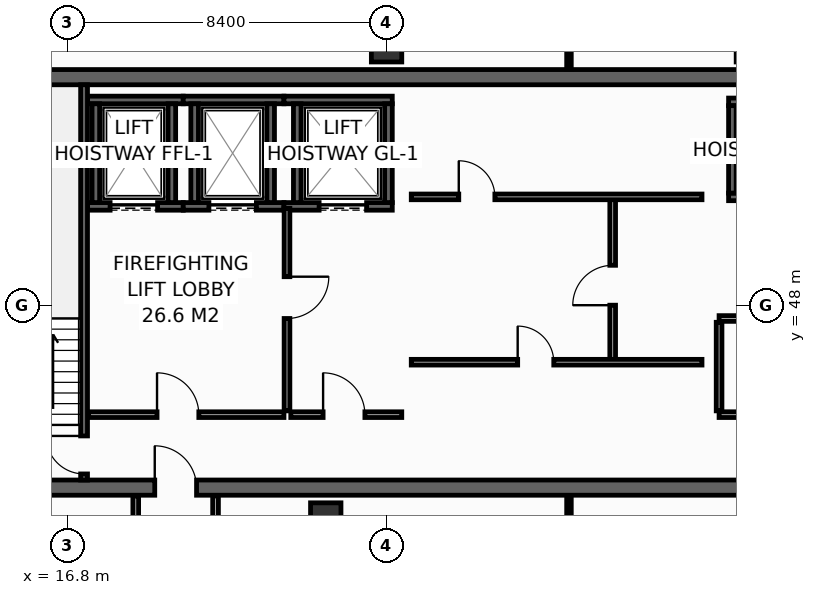
"""IFC4 building model, lengths in metres.
Left out: names, types, materials, properties, quantities, classifications, styles, units other than length and angle.
Written with IfcOpenShell. Run it as: python <this file> out.ifc"""

import sys

from ifc_helpers import new_model, si_unit, direction, frame, frame_2d, origin, origin_2d, place, context, subcontext, project, spatial, rectangle, hollow_rectangle, extrude, element, fill, save


model = new_model("IFC4")
c1 = context("Model", 3, precision=1e-05, world=origin(), true_north=direction((0.0, 1.0)))
c2 = subcontext(c1, "Body", "Model", "MODEL_VIEW")
j1 = project(units=[si_unit("LENGTHUNIT", "METRE"), si_unit("PLANEANGLEUNIT", "RADIAN")], contexts=[c1])
p1 = place(None, origin())
s1 = spatial("IfcSite", under=j1, at=p1, CompositionType="ELEMENT")
p2 = place(p1, origin())
s2 = spatial("IfcBuilding", under=s1, at=p2, CompositionType="ELEMENT")
p3 = place(p2, frame((0.0, 0.0, 234.4)))
s3 = spatial("IfcBuildingStorey", under=s2, at=p3, CompositionType="ELEMENT", Elevation=234.4)
p4 = place(p3, frame((13.7, 43.2, 0.0), z_axis=(0.0, 0.0, 1.0), x_axis=(1.0, 0.0, 0.0)))
e1 = element("IfcWall", 1, at=p4, inside=s3, PredefinedType="SHEAR", context=c2, shape_type="SweptSolid", body=[
    extrude(rectangle(XDim=32.5, YDim=0.4, at=frame_2d((16.25, 0.0))), origin(), (0.0, 0.0, 1.0), 3.55),
])
p5 = place(p4, frame((5.4, 0.0, 0.0)))
e2 = element("IfcOpeningElement", 2, at=p5, cuts=e1, PredefinedType="OPENING", context=c2, shape_type="SweptSolid", body=[
    extrude(rectangle(XDim=1.1, YDim=2.15, at=frame_2d((0.55, 1.075))), frame((0.0, 0.21, 0.0), z_axis=(0.0, -1.0, 0.0), x_axis=(1.0, 0.0, 0.0)), (0.0, 0.0, 1.0), 0.42),
])
p6 = place(p4, frame((25.6, 0.0, 0.0)))
e3 = element("IfcOpeningElement", 3, at=p6, cuts=e1, PredefinedType="OPENING", context=c2, shape_type="SweptSolid", body=[
    extrude(rectangle(XDim=1.1, YDim=2.15, at=frame_2d((0.55, 1.075))), frame((0.0, 0.21, 0.0), z_axis=(0.0, -1.0, 0.0), x_axis=(1.0, 0.0, 0.0)), (0.0, 0.0, 1.0), 0.42),
])
p7 = place(p3, frame((13.7, 54.0, 0.0), z_axis=(0.0, 0.0, 1.0), x_axis=(1.0, 0.0, 0.0)))
e4 = element("IfcWall", 4, at=p7, inside=s3, PredefinedType="SHEAR", context=c2, shape_type="SweptSolid", body=[
    extrude(rectangle(XDim=32.5, YDim=0.4, at=frame_2d((16.25, 0.0))), origin(), (0.0, 0.0, 1.0), 3.55),
])
for number, where, z_axis, x_axis in (
    (5, (25.2, 54.8, 0.0), (0.0, 0.0, 1.0), (1.0, 0.0, 0.0)),
    (6, (23.6, 42.4, 0.0), (0.0, 0.0, 1.0), (1.0, 0.0, 0.0)),
):
    element("IfcColumn", number, at=place(p3, frame(where, z_axis=z_axis, x_axis=x_axis)), inside=s3, PredefinedType="COLUMN", context=c2, shape_type="SweptSolid", body=[
        extrude(hollow_rectangle(XDim=0.8, YDim=0.8, WallThickness=0.036, at=origin_2d()), origin(), (0.0, 0.0, 1.0), 3.8),
    ])
p8 = place(p3, frame((17.33, 50.6, 0.0), z_axis=(0.0, 0.0, 1.0), x_axis=(1.0, 0.0, 0.0)))
e7 = element("IfcWall", 7, at=p8, inside=s3, PredefinedType="SHEAR", context=c2, shape_type="SweptSolid", body=[
    extrude(rectangle(XDim=2.52, YDim=0.2, at=frame_2d((1.26, 0.0))), origin(), (0.0, 0.0, 1.0), 3.55),
])
p9 = place(p8, frame((0.595, 0.0, 0.0)))
e8 = element("IfcOpeningElement", 8, at=p9, cuts=e7, PredefinedType="OPENING", context=c2, shape_type="SweptSolid", body=[
    extrude(rectangle(XDim=1.25, YDim=2.3, at=frame_2d((0.625, 1.15))), frame((0.0, 0.11, 0.0), z_axis=(0.0, -1.0, 0.0), x_axis=(1.0, 0.0, 0.0)), (0.0, 0.0, 1.0), 0.22),
])
p10 = place(p3, frame((17.33, 53.4, 0.0), z_axis=(0.0, 0.0, 1.0), x_axis=(1.0, 0.0, 0.0)))
e9 = element("IfcWall", 9, at=p10, inside=s3, PredefinedType="SHEAR", context=c2, shape_type="SweptSolid", body=[
    extrude(rectangle(XDim=2.52, YDim=0.2, at=frame_2d((1.26, 0.0))), origin(), (0.0, 0.0, 1.0), 3.55),
])
for number, where, z_axis, x_axis in (
    (10, (17.55, 50.7, 0.0), (0.0, 0.0, 1.0), (0.0, 1.0, 0.0)),
    (11, (19.55, 50.7, 0.0), (0.0, 0.0, 1.0), (0.0, 1.0, 0.0)),
):
    element("IfcWall", number, at=place(p3, frame(where, z_axis=z_axis, x_axis=x_axis)), inside=s3, PredefinedType="SHEAR", context=c2, shape_type="SweptSolid", body=[
        extrude(rectangle(XDim=2.6, YDim=0.2, at=frame_2d((1.3, 0.0))), origin(), (0.0, 0.0, 1.0), 3.55),
    ])
p11 = place(p3, frame((19.85, 50.6, 0.0), z_axis=(0.0, 0.0, 1.0), x_axis=(1.0, 0.0, 0.0)))
e12 = element("IfcWall", 12, at=p11, inside=s3, PredefinedType="SHEAR", context=c2, shape_type="SweptSolid", body=[
    extrude(rectangle(XDim=2.65, YDim=0.2, at=frame_2d((1.325, 0.0))), origin(), (0.0, 0.0, 1.0), 3.55),
])
p12 = place(p11, frame((0.675, 0.0, 0.0)))
e13 = element("IfcOpeningElement", 13, at=p12, cuts=e12, PredefinedType="OPENING", context=c2, shape_type="SweptSolid", body=[
    extrude(rectangle(XDim=1.25, YDim=2.3, at=frame_2d((0.625, 1.15))), frame((0.0, 0.11, 0.0), z_axis=(0.0, -1.0, 0.0), x_axis=(1.0, 0.0, 0.0)), (0.0, 0.0, 1.0), 0.22),
])
p13 = place(p3, frame((19.85, 53.4, 0.0), z_axis=(0.0, 0.0, 1.0), x_axis=(1.0, 0.0, 0.0)))
e14 = element("IfcWall", 14, at=p13, inside=s3, PredefinedType="SHEAR", context=c2, shape_type="SweptSolid", body=[
    extrude(rectangle(XDim=2.65, YDim=0.2, at=frame_2d((1.325, 0.0))), origin(), (0.0, 0.0, 1.0), 3.55),
])
for number, where, z_axis, x_axis in (
    (15, (20.15, 50.7, 0.0), (0.0, 0.0, 1.0), (0.0, 1.0, 0.0)),
    (16, (22.15, 50.7, 0.0), (0.0, 0.0, 1.0), (0.0, 1.0, 0.0)),
):
    element("IfcWall", number, at=place(p3, frame(where, z_axis=z_axis, x_axis=x_axis)), inside=s3, PredefinedType="SHEAR", context=c2, shape_type="SweptSolid", body=[
        extrude(rectangle(XDim=2.6, YDim=0.2, at=frame_2d((1.3, 0.0))), origin(), (0.0, 0.0, 1.0), 3.55),
    ])
p14 = place(p3, frame((22.5, 50.6, 0.0), z_axis=(0.0, 0.0, 1.0), x_axis=(1.0, 0.0, 0.0)))
e17 = element("IfcWall", 17, at=p14, inside=s3, PredefinedType="SHEAR", context=c2, shape_type="SweptSolid", body=[
    extrude(rectangle(XDim=2.85, YDim=0.2, at=frame_2d((1.425, 0.0))), origin(), (0.0, 0.0, 1.0), 3.55),
])
p15 = place(p14, frame((0.925, 0.0, 0.0)))
e18 = element("IfcOpeningElement", 18, at=p15, cuts=e17, PredefinedType="OPENING", context=c2, shape_type="SweptSolid", body=[
    extrude(rectangle(XDim=1.25, YDim=2.3, at=frame_2d((0.625, 1.15))), frame((0.0, 0.11, 0.0), z_axis=(0.0, -1.0, 0.0), x_axis=(1.0, 0.0, 0.0)), (0.0, 0.0, 1.0), 0.22),
])
p16 = place(p3, frame((22.5, 53.4, 0.0), z_axis=(0.0, 0.0, 1.0), x_axis=(1.0, 0.0, 0.0)))
e19 = element("IfcWall", 19, at=p16, inside=s3, PredefinedType="SHEAR", context=c2, shape_type="SweptSolid", body=[
    extrude(rectangle(XDim=2.85, YDim=0.2, at=frame_2d((1.425, 0.0))), origin(), (0.0, 0.0, 1.0), 3.55),
])
for number, where, z_axis, x_axis in (
    (20, (22.85, 50.7, 0.0), (0.0, 0.0, 1.0), (0.0, 1.0, 0.0)),
    (21, (25.25, 50.7, 0.0), (0.0, 0.0, 1.0), (0.0, 1.0, 0.0)),
):
    element("IfcWall", number, at=place(p3, frame(where, z_axis=z_axis, x_axis=x_axis)), inside=s3, PredefinedType="SHEAR", context=c2, shape_type="SweptSolid", body=[
        extrude(rectangle(XDim=2.6, YDim=0.2, at=frame_2d((1.3, 0.0))), origin(), (0.0, 0.0, 1.0), 3.55),
    ])
p17 = place(p3, frame((34.2, 50.85, 0.0), z_axis=(0.0, 0.0, 1.0), x_axis=(1.0, 0.0, 0.0)))
e22 = element("IfcWall", 22, at=p17, inside=s3, PredefinedType="SHEAR", context=c2, shape_type="SweptSolid", body=[
    extrude(rectangle(XDim=2.575, YDim=0.2, at=frame_2d((1.288, 0.0))), origin(), (0.0, 0.0, 1.0), 3.55),
])
p18 = place(p17, frame((0.65, 0.0, 0.0)))
e23 = element("IfcOpeningElement", 23, at=p18, cuts=e22, PredefinedType="OPENING", context=c2, shape_type="SweptSolid", body=[
    extrude(rectangle(XDim=1.1, YDim=2.2, at=frame_2d((0.55, 1.1))), frame((0.0, 0.11, 0.0), z_axis=(0.0, -1.0, 0.0), x_axis=(1.0, 0.0, 0.0)), (0.0, 0.0, 1.0), 0.22),
])
p19 = place(p3, frame((34.2, 53.35, 0.0), z_axis=(0.0, 0.0, 1.0), x_axis=(1.0, 0.0, 0.0)))
e24 = element("IfcWall", 24, at=p19, inside=s3, PredefinedType="SHEAR", context=c2, shape_type="SweptSolid", body=[
    extrude(rectangle(XDim=2.575, YDim=0.2, at=frame_2d((1.288, 0.0))), origin(), (0.0, 0.0, 1.0), 3.55),
])
p20 = place(p3, frame((34.3, 50.95, 0.0), z_axis=(0.0, 0.0, 1.0), x_axis=(0.0, 1.0, 0.0)))
e25 = element("IfcWall", 25, at=p20, inside=s3, PredefinedType="SHEAR", context=c2, shape_type="SweptSolid", body=[
    extrude(rectangle(XDim=2.3, YDim=0.2, at=frame_2d((1.15, 0.0))), origin(), (0.0, 0.0, 1.0), 3.55),
])
p21 = place(p3, frame((17.24, 43.4, 0.0), z_axis=(0.0, 0.0, 1.0), x_axis=(0.0, 1.0, 0.0)))
e26 = element("IfcWall", 26, at=p21, inside=s3, PredefinedType="SHEAR", context=c2, shape_type="SweptSolid", body=[
    extrude(rectangle(XDim=10.4, YDim=0.18, at=frame_2d((5.2, 0.0))), origin(), (0.0, 0.0, 1.0), 3.55),
])
p22 = place(p21, frame((0.16, 0.0, 0.0)))
e27 = element("IfcOpeningElement", 27, at=p22, cuts=e26, PredefinedType="OPENING", context=c2, shape_type="SweptSolid", body=[
    extrude(rectangle(XDim=1.0, YDim=2.15, at=frame_2d((0.5, 1.075))), frame((0.0, 0.1, 0.0), z_axis=(0.0, -1.0, 0.0), x_axis=(1.0, 0.0, 0.0)), (0.0, 0.0, 1.0), 0.2),
])
p23 = place(p3, frame((17.36, 45.12, 0.0), z_axis=(0.0, 0.0, 1.0), x_axis=(1.0, 0.0, 0.0)))
e28 = element("IfcWall", 28, at=p23, inside=s3, PredefinedType="PARTITIONING", context=c2, shape_type="SweptSolid", body=[
    extrude(rectangle(XDim=5.14, YDim=0.15, at=frame_2d((2.57, 0.0))), origin(), (0.0, 0.0, 1.0), 3.55),
])
p24 = place(p23, frame((1.8, 0.0, 0.0)))
e29 = element("IfcOpeningElement", 29, at=p24, cuts=e28, PredefinedType="OPENING", context=c2, shape_type="SweptSolid", body=[
    extrude(rectangle(XDim=1.1, YDim=2.15, at=frame_2d((0.55, 1.075))), frame((0.0, 0.085, 0.0), z_axis=(0.0, -1.0, 0.0), x_axis=(1.0, 0.0, 0.0)), (0.0, 0.0, 1.0), 0.17),
])
p25 = place(p3, frame((22.58, 50.55, 0.0), z_axis=(0.0, 0.0, 1.0), x_axis=(0.0, -1.0, 0.0)))
e30 = element("IfcWall", 30, at=p25, inside=s3, PredefinedType="PARTITIONING", context=c2, shape_type="SweptSolid", body=[
    extrude(rectangle(XDim=5.33, YDim=0.15, at=frame_2d((2.665, 0.0))), origin(), (0.0, 0.0, 1.0), 3.55),
])
p26 = place(p25, frame((1.8, 0.0, 0.0)))
e31 = element("IfcOpeningElement", 31, at=p26, cuts=e30, PredefinedType="OPENING", context=c2, shape_type="SweptSolid", body=[
    extrude(rectangle(XDim=1.1, YDim=2.15, at=frame_2d((0.55, 1.075))), frame((0.0, 0.085, 0.0), z_axis=(0.0, -1.0, 0.0), x_axis=(1.0, 0.0, 0.0)), (0.0, 0.0, 1.0), 0.17),
])
p27 = place(p3, frame((22.68, 45.12, 0.0), z_axis=(0.0, 0.0, 1.0), x_axis=(1.0, 0.0, 0.0)))
e32 = element("IfcWall", 32, at=p27, inside=s3, PredefinedType="PARTITIONING", context=c2, shape_type="SweptSolid", body=[
    extrude(rectangle(XDim=2.92, YDim=0.15, at=frame_2d((1.46, 0.0))), origin(), (0.0, 0.0, 1.0), 3.55),
])
p28 = place(p27, frame((0.85, 0.0, 0.0)))
e33 = element("IfcOpeningElement", 33, at=p28, cuts=e32, PredefinedType="OPENING", context=c2, shape_type="SweptSolid", body=[
    extrude(rectangle(XDim=1.1, YDim=2.15, at=frame_2d((0.55, 1.075))), frame((0.0, 0.085, 0.0), z_axis=(0.0, -1.0, 0.0), x_axis=(1.0, 0.0, 0.0)), (0.0, 0.0, 1.0), 0.17),
])
p29 = place(p3, frame((31.15, 46.5, 0.0), z_axis=(0.0, 0.0, 1.0), x_axis=(0.0, 1.0, 0.0)))
e34 = element("IfcWall", 34, at=p29, inside=s3, PredefinedType="PARTITIONING", context=c2, shape_type="SweptSolid", body=[
    extrude(rectangle(XDim=4.35, YDim=0.15, at=frame_2d((2.175, 0.0))), origin(), (0.0, 0.0, 1.0), 3.55),
])
p30 = place(p29, frame((1.5, 0.0, 0.0)))
e35 = element("IfcOpeningElement", 35, at=p30, cuts=e34, PredefinedType="OPENING", context=c2, shape_type="SweptSolid", body=[
    extrude(rectangle(XDim=1.05, YDim=2.15, at=frame_2d((0.525, 1.075))), frame((0.0, 0.085, 0.0), z_axis=(0.0, -1.0, 0.0), x_axis=(1.0, 0.0, 0.0)), (0.0, 0.0, 1.0), 0.17),
])
p31 = place(p3, frame((33.95, 45.12, 0.0), z_axis=(0.0, 0.0, 1.0), x_axis=(1.0, 0.0, 0.0)))
e36 = element("IfcWall", 36, at=p31, inside=s3, PredefinedType="PARTITIONING", context=c2, shape_type="SweptSolid", body=[
    extrude(rectangle(XDim=8.55, YDim=0.15, at=frame_2d((4.275, 0.0))), origin(), (0.0, 0.0, 1.0), 3.55),
])
p32 = place(p31, frame((0.95, 0.0, 0.0)))
e37 = element("IfcOpeningElement", 37, at=p32, cuts=e36, PredefinedType="OPENING", context=c2, shape_type="SweptSolid", body=[
    extrude(rectangle(XDim=0.95, YDim=2.15, at=frame_2d((0.475, 1.075))), frame((0.0, 0.085, 0.0), z_axis=(0.0, -1.0, 0.0), x_axis=(1.0, 0.0, 0.0)), (0.0, 0.0, 1.0), 0.17),
])
p33 = place(p31, frame((3.8, 0.0, 0.0)))
e38 = element("IfcOpeningElement", 38, at=p33, cuts=e36, PredefinedType="OPENING", context=c2, shape_type="SweptSolid", body=[
    extrude(rectangle(XDim=0.95, YDim=2.15, at=frame_2d((0.475, 1.075))), frame((0.0, 0.085, 0.0), z_axis=(0.0, -1.0, 0.0), x_axis=(1.0, 0.0, 0.0)), (0.0, 0.0, 1.0), 0.17),
])
p34 = place(p31, frame((6.65, 0.0, 0.0)))
e39 = element("IfcOpeningElement", 39, at=p34, cuts=e36, PredefinedType="OPENING", context=c2, shape_type="SweptSolid", body=[
    extrude(rectangle(XDim=0.95, YDim=2.15, at=frame_2d((0.475, 1.075))), frame((0.0, 0.085, 0.0), z_axis=(0.0, -1.0, 0.0), x_axis=(1.0, 0.0, 0.0)), (0.0, 0.0, 1.0), 0.17),
])
p35 = place(p3, frame((33.95, 47.65, 0.0), z_axis=(0.0, 0.0, 1.0), x_axis=(1.0, 0.0, 0.0)))
e40 = element("IfcWall", 40, at=p35, inside=s3, PredefinedType="PARTITIONING", context=c2, shape_type="SweptSolid", body=[
    extrude(rectangle(XDim=8.55, YDim=0.15, at=frame_2d((4.275, 0.0))), origin(), (0.0, 0.0, 1.0), 3.55),
])
p36 = place(p3, frame((33.95, 45.22, 0.0), z_axis=(0.0, 0.0, 1.0), x_axis=(0.0, 1.0, 0.0)))
e41 = element("IfcWall", 41, at=p36, inside=s3, PredefinedType="PARTITIONING", context=c2, shape_type="SweptSolid", body=[
    extrude(rectangle(XDim=2.33, YDim=0.15, at=frame_2d((1.165, 0.0))), origin(), (0.0, 0.0, 1.0), 3.55),
])
p37 = place(p3, frame((25.85, 50.85, 0.0), z_axis=(0.0, 0.0, 1.0), x_axis=(1.0, 0.0, 0.0)))
e42 = element("IfcWall", 42, at=p37, inside=s3, PredefinedType="PARTITIONING", context=c2, shape_type="SweptSolid", body=[
    extrude(rectangle(XDim=7.65, YDim=0.15, at=frame_2d((3.825, 0.0))), origin(), (0.0, 0.0, 1.0), 3.55),
])
p38 = place(p37, frame((1.25, 0.0, 0.0)))
e43 = element("IfcOpeningElement", 43, at=p38, cuts=e42, PredefinedType="OPENING", context=c2, shape_type="SweptSolid", body=[
    extrude(rectangle(XDim=0.95, YDim=2.15, at=frame_2d((0.475, 1.075))), frame((0.0, 0.085, 0.0), z_axis=(0.0, -1.0, 0.0), x_axis=(1.0, 0.0, 0.0)), (0.0, 0.0, 1.0), 0.17),
])
p39 = place(p3, frame((25.85, 46.5, 0.0), z_axis=(0.0, 0.0, 1.0), x_axis=(1.0, 0.0, 0.0)))
e44 = element("IfcWall", 44, at=p39, inside=s3, PredefinedType="PARTITIONING", context=c2, shape_type="SweptSolid", body=[
    extrude(rectangle(XDim=7.65, YDim=0.15, at=frame_2d((3.825, 0.0))), origin(), (0.0, 0.0, 1.0), 3.55),
])
p40 = place(p39, frame((2.8, 0.0, 0.0)))
e45 = element("IfcOpeningElement", 45, at=p40, cuts=e44, PredefinedType="OPENING", context=c2, shape_type="SweptSolid", body=[
    extrude(rectangle(XDim=0.95, YDim=2.15, at=frame_2d((0.475, 1.075))), frame((0.0, 0.085, 0.0), z_axis=(0.0, -1.0, 0.0), x_axis=(1.0, 0.0, 0.0)), (0.0, 0.0, 1.0), 0.17),
])
p41 = place(p3, frame((30.0, 54.22, 0.0), z_axis=(0.0, 0.0, 1.0), x_axis=(0.0, 1.0, 0.0)))
e46 = element("IfcWall", 46, at=p41, inside=s3, PredefinedType="PARTITIONING", context=c2, shape_type="SweptSolid", body=[
    extrude(rectangle(XDim=1.775, YDim=0.12, at=frame_2d((0.888, 0.0))), origin(), (0.0, 0.0, 1.0), 2.935),
])
for number, where, z_axis, x_axis in (
    (47, (18.6, 40.95, 0.0), (0.0, 0.0, 1.0), (0.0, 1.0, 0.0)),
    (48, (20.7, 40.95, 0.0), (0.0, 0.0, 1.0), (0.0, 1.0, 0.0)),
):
    element("IfcWall", number, at=place(p3, frame(where, z_axis=z_axis, x_axis=x_axis)), inside=s3, PredefinedType="PARTITIONING", context=c2, shape_type="SweptSolid", body=[
        extrude(rectangle(XDim=2.03, YDim=0.15, at=frame_2d((1.015, 0.0))), origin(), (0.0, 0.0, 1.0), 3.55),
    ])
p42 = place(p3, frame((30.0, 40.95, 0.0), z_axis=(0.0, 0.0, 1.0), x_axis=(0.0, 1.0, 0.0)))
e49 = element("IfcWall", 49, at=p42, inside=s3, PredefinedType="PARTITIONING", context=c2, shape_type="SweptSolid", body=[
    extrude(rectangle(XDim=2.03, YDim=0.12, at=frame_2d((1.015, 0.0))), origin(), (0.0, 0.0, 1.0), 2.947),
])
p43 = place(p9, origin())
e50 = element("IfcDoor", 50, at=p43, inside=s3, OperationType="SLIDING_TO_LEFT", PredefinedType="DOOR", context=c2, shape_type="SweptSolid", body=[
    extrude(rectangle(XDim=1.25, YDim=2.3, at=frame_2d((0.625, 1.15))), frame((0.0, 0.025, 0.0), z_axis=(0.0, -1.0, 0.0), x_axis=(1.0, 0.0, 0.0)), (0.0, 0.0, 1.0), 0.05),
])
fill(e8, e50)
p44 = place(p12, origin())
e51 = element("IfcDoor", 51, at=p44, inside=s3, OperationType="SLIDING_TO_LEFT", PredefinedType="DOOR", context=c2, shape_type="SweptSolid", body=[
    extrude(rectangle(XDim=1.25, YDim=2.3, at=frame_2d((0.625, 1.15))), frame((0.0, 0.025, 0.0), z_axis=(0.0, -1.0, 0.0), x_axis=(1.0, 0.0, 0.0)), (0.0, 0.0, 1.0), 0.05),
])
fill(e13, e51)
p45 = place(p15, origin())
e52 = element("IfcDoor", 52, at=p45, inside=s3, OperationType="SLIDING_TO_LEFT", PredefinedType="DOOR", context=c2, shape_type="SweptSolid", body=[
    extrude(rectangle(XDim=1.25, YDim=2.3, at=frame_2d((0.625, 1.15))), frame((0.0, 0.025, 0.0), z_axis=(0.0, -1.0, 0.0), x_axis=(1.0, 0.0, 0.0)), (0.0, 0.0, 1.0), 0.05),
])
fill(e18, e52)
p46 = place(p22, origin())
e53 = element("IfcDoor", 53, at=p46, inside=s3, OperationType="SINGLE_SWING_RIGHT", PredefinedType="DOOR", context=c2, shape_type="SweptSolid", body=[
    extrude(rectangle(XDim=1.0, YDim=2.15, at=frame_2d((0.5, 1.075))), frame((0.0, 0.025, 0.0), z_axis=(0.0, -1.0, 0.0), x_axis=(1.0, 0.0, 0.0)), (0.0, 0.0, 1.0), 0.05),
])
fill(e27, e53)
p47 = place(p24, origin())
e54 = element("IfcDoor", 54, at=p47, inside=s3, OperationType="SINGLE_SWING_LEFT", PredefinedType="DOOR", context=c2, shape_type="SweptSolid", body=[
    extrude(rectangle(XDim=1.1, YDim=2.15, at=frame_2d((0.55, 1.075))), frame((0.0, 0.025, 0.0), z_axis=(0.0, -1.0, 0.0), x_axis=(1.0, 0.0, 0.0)), (0.0, 0.0, 1.0), 0.05),
])
fill(e29, e54)
p48 = place(p26, origin())
e55 = element("IfcDoor", 55, at=p48, inside=s3, OperationType="SINGLE_SWING_LEFT", PredefinedType="DOOR", context=c2, shape_type="SweptSolid", body=[
    extrude(rectangle(XDim=1.1, YDim=2.15, at=frame_2d((0.55, 1.075))), frame((0.0, 0.025, 0.0), z_axis=(0.0, -1.0, 0.0), x_axis=(1.0, 0.0, 0.0)), (0.0, 0.0, 1.0), 0.05),
])
fill(e31, e55)
p49 = place(p28, origin())
e56 = element("IfcDoor", 56, at=p49, inside=s3, OperationType="SINGLE_SWING_LEFT", PredefinedType="DOOR", context=c2, shape_type="SweptSolid", body=[
    extrude(rectangle(XDim=1.1, YDim=2.15, at=frame_2d((0.55, 1.075))), frame((0.0, 0.025, 0.0), z_axis=(0.0, -1.0, 0.0), x_axis=(1.0, 0.0, 0.0)), (0.0, 0.0, 1.0), 0.05),
])
fill(e33, e56)
p50 = place(p5, origin())
e57 = element("IfcDoor", 57, at=p50, inside=s3, OperationType="SINGLE_SWING_LEFT", PredefinedType="DOOR", context=c2, shape_type="SweptSolid", body=[
    extrude(rectangle(XDim=1.1, YDim=2.15, at=frame_2d((0.55, 1.075))), frame((0.0, 0.025, 0.0), z_axis=(0.0, -1.0, 0.0), x_axis=(1.0, 0.0, 0.0)), (0.0, 0.0, 1.0), 0.05),
])
fill(e2, e57)
p51 = place(p30, origin())
e58 = element("IfcDoor", 58, at=p51, inside=s3, OperationType="SINGLE_SWING_LEFT", PredefinedType="DOOR", context=c2, shape_type="SweptSolid", body=[
    extrude(rectangle(XDim=1.05, YDim=2.15, at=frame_2d((0.525, 1.075))), frame((0.0, 0.025, 0.0), z_axis=(0.0, -1.0, 0.0), x_axis=(1.0, 0.0, 0.0)), (0.0, 0.0, 1.0), 0.05),
])
fill(e35, e58)
p52 = place(p38, origin())
e59 = element("IfcDoor", 59, at=p52, inside=s3, OperationType="SINGLE_SWING_LEFT", PredefinedType="DOOR", context=c2, shape_type="SweptSolid", body=[
    extrude(rectangle(XDim=0.95, YDim=2.15, at=frame_2d((0.475, 1.075))), frame((0.0, 0.025, 0.0), z_axis=(0.0, -1.0, 0.0), x_axis=(1.0, 0.0, 0.0)), (0.0, 0.0, 1.0), 0.05),
])
fill(e43, e59)
p53 = place(p40, origin())
e60 = element("IfcDoor", 60, at=p53, inside=s3, OperationType="SINGLE_SWING_LEFT", PredefinedType="DOOR", context=c2, shape_type="SweptSolid", body=[
    extrude(rectangle(XDim=0.95, YDim=2.15, at=frame_2d((0.475, 1.075))), frame((0.0, 0.025, 0.0), z_axis=(0.0, -1.0, 0.0), x_axis=(1.0, 0.0, 0.0)), (0.0, 0.0, 1.0), 0.05),
])
fill(e45, e60)
save(model, sys.argv[1])
